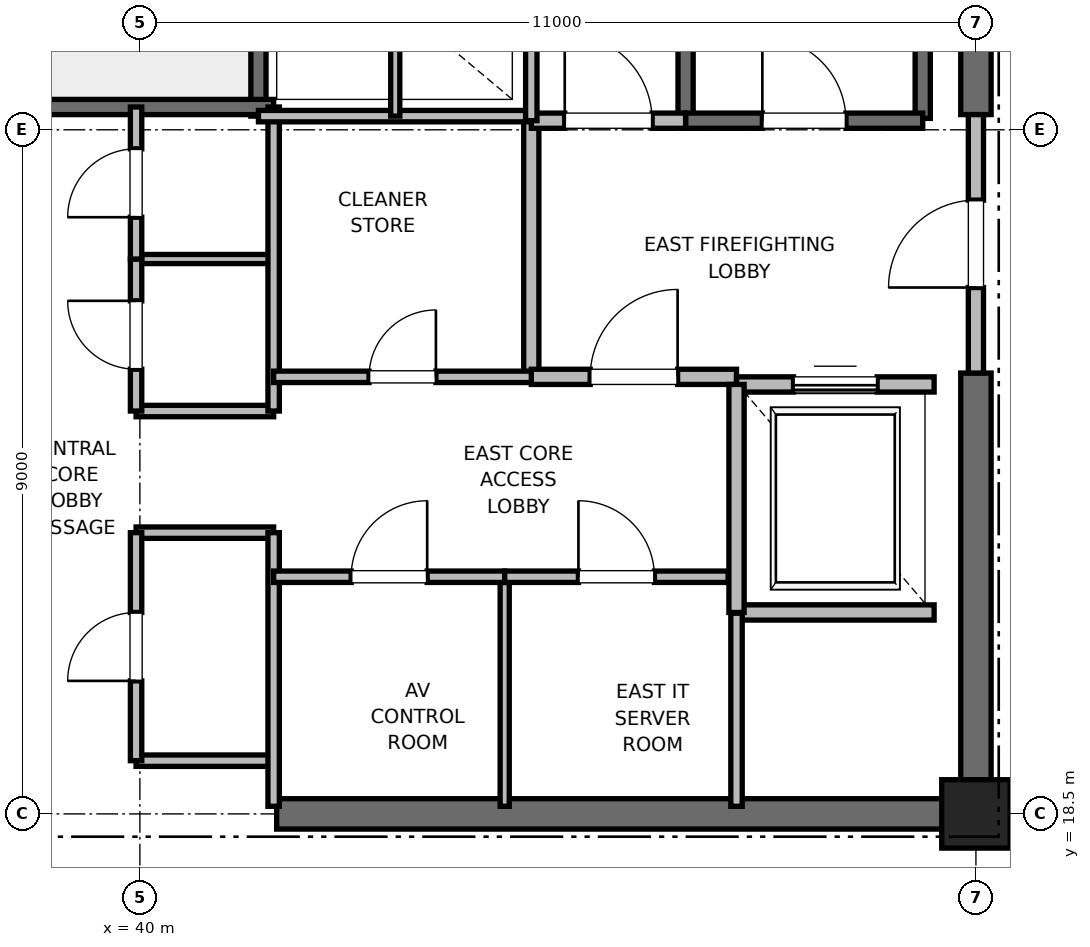
"""IFC4 building model, lengths in metres.
Left out: names, types, materials, properties, quantities, classifications, styles, units other than length and angle.
Written with IfcOpenShell. Run it as: python <this file> out.ifc"""

import sys

from ifc_helpers import new_model, si_unit, direction, frame, frame_2d, origin, origin_2d, place, context, subcontext, project, spatial, rectangle, extrude, element, fill, save


model = new_model("IFC4")
c1 = context("Model", 3, precision=1e-05, world=origin(), true_north=direction((0.0, 1.0)))
c2 = subcontext(c1, "Body", "Model", "MODEL_VIEW")
j1 = project(units=[si_unit("LENGTHUNIT", "METRE"), si_unit("PLANEANGLEUNIT", "RADIAN")], contexts=[c1])
p1 = place(None, origin())
s1 = spatial("IfcSite", under=j1, at=p1, CompositionType="ELEMENT")
p2 = place(p1, origin())
s2 = spatial("IfcBuilding", under=s1, at=p2, CompositionType="ELEMENT")
p3 = place(p2, frame((0.0, 0.0, 338.8)))
s3 = spatial("IfcBuildingStorey", under=s2, at=p3, CompositionType="ELEMENT", Elevation=338.8)
p4 = place(p3, frame((51.0, 18.5, 0.0), z_axis=(0.0, 0.0, 1.0), x_axis=(1.0, 0.0, 0.0)))
e1 = element("IfcColumn", 1, at=p4, inside=s3, PredefinedType="PILASTER", context=c2, shape_type="SweptSolid", body=[
    extrude(rectangle(XDim=0.9, YDim=0.9, at=origin_2d()), origin(), (0.0, 0.0, 1.0), 4.0),
])
p5 = place(p3, frame((41.8, 18.5, 0.0), z_axis=(0.0, 0.0, 1.0), x_axis=(1.0, 0.0, 0.0)))
e2 = element("IfcWall", 2, at=p5, inside=s3, PredefinedType="SHEAR", context=c2, shape_type="SweptSolid", body=[
    extrude(rectangle(XDim=9.2, YDim=0.4, at=frame_2d((4.6, 0.0))), origin(), (0.0, 0.0, 1.0), 3.7),
])
p6 = place(p3, frame((51.0, 18.5, 0.0), z_axis=(0.0, 0.0, 1.0), x_axis=(0.0, 1.0, 0.0)))
e3 = element("IfcWall", 3, at=p6, inside=s3, PredefinedType="SHEAR", context=c2, shape_type="SweptSolid", body=[
    extrude(rectangle(XDim=5.8, YDim=0.4, at=frame_2d((2.9, 0.0))), origin(), (0.0, 0.0, 1.0), 3.7),
])
p7 = place(p3, frame((51.0, 27.7, 0.0), z_axis=(0.0, 0.0, 1.0), x_axis=(0.0, 1.0, 0.0)))
e4 = element("IfcWall", 4, at=p7, inside=s3, PredefinedType="SHEAR", context=c2, shape_type="SweptSolid", body=[
    extrude(rectangle(XDim=8.8, YDim=0.4, at=frame_2d((4.4, 0.0))), origin(), (0.0, 0.0, 1.0), 3.7),
])
p8 = place(p3, frame((50.3, 27.65, 0.0), z_axis=(0.0, 0.0, 1.0), x_axis=(0.0, 1.0, 0.0)))
e5 = element("IfcWall", 5, at=p8, inside=s3, PredefinedType="SOLIDWALL", context=c2, shape_type="SweptSolid", body=[
    extrude(rectangle(XDim=8.15, YDim=0.2, at=frame_2d((4.075, 0.0))), origin(), (0.0, 0.0, 1.0), 3.7),
])
p9 = place(p3, frame((47.18, 27.62, 0.0), z_axis=(0.0, 0.0, 1.0), x_axis=(0.0, 1.0, 0.0)))
e6 = element("IfcWall", 6, at=p9, inside=s3, PredefinedType="SOLIDWALL", context=c2, shape_type="SweptSolid", body=[
    extrude(rectangle(XDim=8.18, YDim=0.2, at=frame_2d((4.09, 0.0))), origin(), (0.0, 0.0, 1.0), 3.7),
])
p10 = place(p3, frame((47.18, 27.62, 0.0), z_axis=(0.0, 0.0, 1.0), x_axis=(1.0, 0.0, 0.0)))
e7 = element("IfcWall", 7, at=p10, inside=s3, PredefinedType="SOLIDWALL", context=c2, shape_type="SweptSolid", body=[
    extrude(rectangle(XDim=3.12, YDim=0.2, at=frame_2d((1.56, 0.0))), origin(), (0.0, 0.0, 1.0), 3.7),
])
p11 = place(p10, frame((1.01, 0.0, 0.0)))
e8 = element("IfcOpeningElement", 8, at=p11, cuts=e7, PredefinedType="OPENING", context=c2, shape_type="SweptSolid", body=[
    extrude(rectangle(XDim=1.1, YDim=2.15, at=frame_2d((0.55, 1.075))), frame((0.0, 0.1, 0.0), z_axis=(0.0, -1.0, 0.0), x_axis=(1.0, 0.0, 0.0)), (0.0, 0.0, 1.0), 0.2),
])
p12 = place(p3, frame((41.56, 27.68, 0.0), z_axis=(0.0, 0.0, 1.0), x_axis=(0.0, 1.0, 0.0)))
e9 = element("IfcWall", 9, at=p12, inside=s3, PredefinedType="SOLIDWALL", context=c2, shape_type="SweptSolid", body=[
    extrude(rectangle(XDim=8.57, YDim=0.2, at=frame_2d((4.285, 0.0))), origin(), (0.0, 0.0, 1.0), 3.7),
])
p13 = place(p3, frame((38.44, 27.8, 0.0), z_axis=(0.0, 0.0, 1.0), x_axis=(1.0, 0.0, 0.0)))
e10 = element("IfcWall", 10, at=p13, inside=s3, PredefinedType="SOLIDWALL", context=c2, shape_type="SweptSolid", body=[
    extrude(rectangle(XDim=3.32, YDim=0.2, at=frame_2d((1.66, 0.0))), origin(), (0.0, 0.0, 1.0), 3.7),
])
p14 = place(p3, frame((45.15, 24.25, 0.0), z_axis=(0.0, 0.0, 1.0), x_axis=(0.0, 1.0, 0.0)))
e11 = element("IfcWall", 11, at=p14, inside=s3, PredefinedType="PARTITIONING", context=c2, shape_type="SweptSolid", body=[
    extrude(rectangle(XDim=3.37, YDim=0.2, at=frame_2d((1.685, 0.0))), origin(), (0.0, 0.0, 1.0), 3.7),
])
p15 = place(p3, frame((45.15, 24.25, 0.0), z_axis=(0.0, 0.0, 1.0), x_axis=(1.0, 0.0, 0.0)))
e12 = element("IfcWall", 12, at=p15, inside=s3, PredefinedType="PARTITIONING", context=c2, shape_type="SweptSolid", body=[
    extrude(rectangle(XDim=2.7, YDim=0.2, at=frame_2d((1.35, 0.0))), origin(), (0.0, 0.0, 1.0), 3.7),
])
p16 = place(p15, frame((0.775, 0.0, 0.0)))
e13 = element("IfcOpeningElement", 13, at=p16, cuts=e12, PredefinedType="OPENING", context=c2, shape_type="SweptSolid", body=[
    extrude(rectangle(XDim=1.15, YDim=2.2, at=frame_2d((0.575, 1.1))), frame((0.0, 0.1, 0.0), z_axis=(0.0, -1.0, 0.0), x_axis=(1.0, 0.0, 0.0)), (0.0, 0.0, 1.0), 0.2),
])
p17 = place(p3, frame((45.15, 27.62, 0.0), z_axis=(0.0, 0.0, 1.0), x_axis=(1.0, 0.0, 0.0)))
e14 = element("IfcWall", 14, at=p17, inside=s3, PredefinedType="PARTITIONING", context=c2, shape_type="SweptSolid", body=[
    extrude(rectangle(XDim=2.03, YDim=0.2, at=frame_2d((1.015, 0.0))), origin(), (0.0, 0.0, 1.0), 3.7),
])
p18 = place(p17, frame((0.44, 0.0, 0.0)))
e15 = element("IfcOpeningElement", 15, at=p18, cuts=e14, PredefinedType="OPENING", context=c2, shape_type="SweptSolid", body=[
    extrude(rectangle(XDim=1.15, YDim=2.2, at=frame_2d((0.575, 1.1))), frame((0.0, 0.1, 0.0), z_axis=(0.0, -1.0, 0.0), x_axis=(1.0, 0.0, 0.0)), (0.0, 0.0, 1.0), 0.2),
])
p19 = place(p3, frame((51.0, 24.3, 0.0), z_axis=(0.0, 0.0, 1.0), x_axis=(0.0, 1.0, 0.0)))
e16 = element("IfcWall", 16, at=p19, inside=s3, PredefinedType="PARTITIONING", context=c2, shape_type="SweptSolid", body=[
    extrude(rectangle(XDim=3.4, YDim=0.2, at=frame_2d((1.7, 0.0))), origin(), (0.0, 0.0, 1.0), 2.78),
])
p20 = place(p19, frame((1.125, 0.0, 0.0)))
e17 = element("IfcOpeningElement", 17, at=p20, cuts=e16, PredefinedType="OPENING", context=c2, shape_type="SweptSolid", body=[
    extrude(rectangle(XDim=1.15, YDim=2.2, at=frame_2d((0.575, 1.1))), frame((0.0, 0.1, 0.0), z_axis=(0.0, -1.0, 0.0), x_axis=(1.0, 0.0, 0.0)), (0.0, 0.0, 1.0), 0.2),
])
p21 = place(p3, frame((47.85, 21.15, 0.0), z_axis=(0.0, 0.0, 1.0), x_axis=(1.0, 0.0, 0.0)))
e18 = element("IfcWall", 18, at=p21, inside=s3, PredefinedType="SOLIDWALL", context=c2, shape_type="SweptSolid", body=[
    extrude(rectangle(XDim=2.6, YDim=0.2, at=frame_2d((1.3, 0.0))), origin(), (0.0, 0.0, 1.0), 3.7),
])
p22 = place(p3, frame((50.45, 24.15, 0.0), z_axis=(0.0, 0.0, 1.0), x_axis=(-1.0, 0.0, 0.0)))
e19 = element("IfcWall", 19, at=p22, inside=s3, PredefinedType="SOLIDWALL", context=c2, shape_type="SweptSolid", body=[
    extrude(rectangle(XDim=2.6, YDim=0.2, at=frame_2d((1.3, 0.0))), origin(), (0.0, 0.0, 1.0), 2.78),
])
p23 = place(p22, frame((0.75, 0.0, 0.0)))
e20 = element("IfcOpeningElement", 20, at=p23, cuts=e19, PredefinedType="OPENING", context=c2, shape_type="SweptSolid", body=[
    extrude(rectangle(XDim=1.1, YDim=2.2, at=frame_2d((0.55, 1.1))), frame((0.0, 0.1, 0.0), z_axis=(0.0, -1.0, 0.0), x_axis=(1.0, 0.0, 0.0)), (0.0, 0.0, 1.0), 0.2),
])
p24 = place(p3, frame((47.85, 24.15, 0.0), z_axis=(0.0, 0.0, 1.0), x_axis=(0.0, -1.0, 0.0)))
e21 = element("IfcWall", 21, at=p24, inside=s3, PredefinedType="SOLIDWALL", context=c2, shape_type="SweptSolid", body=[
    extrude(rectangle(XDim=3.0, YDim=0.2, at=frame_2d((1.5, 0.0))), origin(), (0.0, 0.0, 1.0), 3.7),
])
for number, where, z_axis, x_axis in (
    (22, (39.95, 19.2, 0.0), (0.0, 0.0, 1.0), (1.0, 0.0, 0.0)),
    (23, (39.95, 22.2, 0.0), (0.0, 0.0, 1.0), (1.0, 0.0, 0.0)),
    (24, (39.95, 23.8, 0.0), (0.0, 0.0, 1.0), (1.0, 0.0, 0.0)),
):
    element("IfcWall", number, at=place(p3, frame(where, z_axis=z_axis, x_axis=x_axis)), inside=s3, PredefinedType="PARTITIONING", context=c2, shape_type="SweptSolid", body=[
        extrude(rectangle(XDim=1.81, YDim=0.15, at=frame_2d((0.905, 0.0))), origin(), (0.0, 0.0, 1.0), 2.85),
    ])
p25 = place(p3, frame((39.95, 25.8, 0.0), z_axis=(0.0, 0.0, 1.0), x_axis=(1.0, 0.0, 0.0)))
e25 = element("IfcWall", 25, at=p25, inside=s3, PredefinedType="PARTITIONING", context=c2, shape_type="SweptSolid", body=[
    extrude(rectangle(XDim=1.81, YDim=0.12, at=frame_2d((0.905, 0.0))), origin(), (0.0, 0.0, 1.0), 2.85),
])
p26 = place(p3, frame((41.76, 18.6, 0.0), z_axis=(0.0, 0.0, 1.0), x_axis=(0.0, 1.0, 0.0)))
e26 = element("IfcWall", 26, at=p26, inside=s3, PredefinedType="PARTITIONING", context=c2, shape_type="SweptSolid", body=[
    extrude(rectangle(XDim=3.6, YDim=0.15, at=frame_2d((1.8, 0.0))), origin(), (0.0, 0.0, 1.0), 2.78),
])
p27 = place(p3, frame((41.76, 23.8, 0.0), z_axis=(0.0, 0.0, 1.0), x_axis=(0.0, 1.0, 0.0)))
e27 = element("IfcWall", 27, at=p27, inside=s3, PredefinedType="PARTITIONING", context=c2, shape_type="SweptSolid", body=[
    extrude(rectangle(XDim=4.0, YDim=0.15, at=frame_2d((2.0, 0.0))), origin(), (0.0, 0.0, 1.0), 2.85),
])
p28 = place(p3, frame((39.95, 19.2, 0.0), z_axis=(0.0, 0.0, 1.0), x_axis=(0.0, 1.0, 0.0)))
e28 = element("IfcWall", 28, at=p28, inside=s3, PredefinedType="PARTITIONING", context=c2, shape_type="SweptSolid", body=[
    extrude(rectangle(XDim=3.0, YDim=0.15, at=frame_2d((1.5, 0.0))), origin(), (0.0, 0.0, 1.0), 2.85),
])
p29 = place(p28, frame((1.05, 0.0, 0.0)))
e29 = element("IfcOpeningElement", 29, at=p29, cuts=e28, PredefinedType="OPENING", context=c2, shape_type="SweptSolid", body=[
    extrude(rectangle(XDim=0.9, YDim=2.1, at=frame_2d((0.45, 1.05))), frame((0.0, 0.075, 0.0), z_axis=(0.0, -1.0, 0.0), x_axis=(1.0, 0.0, 0.0)), (0.0, 0.0, 1.0), 0.15),
])
p30 = place(p3, frame((39.95, 23.8, 0.0), z_axis=(0.0, 0.0, 1.0), x_axis=(0.0, 1.0, 0.0)))
e30 = element("IfcWall", 30, at=p30, inside=s3, PredefinedType="PARTITIONING", context=c2, shape_type="SweptSolid", body=[
    extrude(rectangle(XDim=2.0, YDim=0.15, at=frame_2d((1.0, 0.0))), origin(), (0.0, 0.0, 1.0), 2.85),
])
p31 = place(p30, frame((0.55, 0.0, 0.0)))
e31 = element("IfcOpeningElement", 31, at=p31, cuts=e30, PredefinedType="OPENING", context=c2, shape_type="SweptSolid", body=[
    extrude(rectangle(XDim=0.9, YDim=2.1, at=frame_2d((0.45, 1.05))), frame((0.0, 0.075, 0.0), z_axis=(0.0, -1.0, 0.0), x_axis=(1.0, 0.0, 0.0)), (0.0, 0.0, 1.0), 0.15),
])
p32 = place(p3, frame((39.95, 25.8, 0.0), z_axis=(0.0, 0.0, 1.0), x_axis=(0.0, 1.0, 0.0)))
e32 = element("IfcWall", 32, at=p32, inside=s3, PredefinedType="PARTITIONING", context=c2, shape_type="SweptSolid", body=[
    extrude(rectangle(XDim=2.0, YDim=0.15, at=frame_2d((1.0, 0.0))), origin(), (0.0, 0.0, 1.0), 2.85),
])
p33 = place(p32, frame((0.55, 0.0, 0.0)))
e33 = element("IfcOpeningElement", 33, at=p33, cuts=e32, PredefinedType="OPENING", context=c2, shape_type="SweptSolid", body=[
    extrude(rectangle(XDim=0.9, YDim=2.1, at=frame_2d((0.45, 1.05))), frame((0.0, 0.075, 0.0), z_axis=(0.0, -1.0, 0.0), x_axis=(1.0, 0.0, 0.0)), (0.0, 0.0, 1.0), 0.15),
])
p34 = place(p3, frame((41.56, 27.68, 0.0), z_axis=(0.0, 0.0, 1.0), x_axis=(1.0, 0.0, 0.0)))
e34 = element("IfcWall", 34, at=p34, inside=s3, PredefinedType="PARTITIONING", context=c2, shape_type="SweptSolid", body=[
    extrude(rectangle(XDim=3.59, YDim=0.15, at=frame_2d((1.795, 0.0))), origin(), (0.0, 0.0, 1.0), 2.85),
])
p35 = place(p3, frame((47.85, 18.6, 0.0), z_axis=(0.0, 0.0, 1.0), x_axis=(0.0, 1.0, 0.0)))
e35 = element("IfcWall", 35, at=p35, inside=s3, PredefinedType="PARTITIONING", context=c2, shape_type="SweptSolid", body=[
    extrude(rectangle(XDim=2.54, YDim=0.15, at=frame_2d((1.27, 0.0))), origin(), (0.0, 0.0, 1.0), 2.85),
])
p36 = place(p3, frame((44.8, 18.6, 0.0), z_axis=(0.0, 0.0, 1.0), x_axis=(0.0, 1.0, 0.0)))
e36 = element("IfcWall", 36, at=p36, inside=s3, PredefinedType="PARTITIONING", context=c2, shape_type="SweptSolid", body=[
    extrude(rectangle(XDim=3.02, YDim=0.12, at=frame_2d((1.51, 0.0))), origin(), (0.0, 0.0, 1.0), 2.85),
])
p37 = place(p3, frame((41.76, 21.62, 0.0), z_axis=(0.0, 0.0, 1.0), x_axis=(1.0, 0.0, 0.0)))
e37 = element("IfcWall", 37, at=p37, inside=s3, PredefinedType="PARTITIONING", context=c2, shape_type="SweptSolid", body=[
    extrude(rectangle(XDim=3.04, YDim=0.15, at=frame_2d((1.52, 0.0))), origin(), (0.0, 0.0, 1.0), 2.85),
])
p38 = place(p37, frame((1.02, 0.0, 0.0)))
e38 = element("IfcOpeningElement", 38, at=p38, cuts=e37, PredefinedType="OPENING", context=c2, shape_type="SweptSolid", body=[
    extrude(rectangle(XDim=1.0, YDim=2.15, at=frame_2d((0.5, 1.075))), frame((0.0, 0.075, 0.0), z_axis=(0.0, -1.0, 0.0), x_axis=(1.0, 0.0, 0.0)), (0.0, 0.0, 1.0), 0.15),
])
p39 = place(p3, frame((44.8, 21.62, 0.0), z_axis=(0.0, 0.0, 1.0), x_axis=(1.0, 0.0, 0.0)))
e39 = element("IfcWall", 39, at=p39, inside=s3, PredefinedType="PARTITIONING", context=c2, shape_type="SweptSolid", body=[
    extrude(rectangle(XDim=2.94, YDim=0.15, at=frame_2d((1.47, 0.0))), origin(), (0.0, 0.0, 1.0), 2.85),
])
p40 = place(p39, frame((0.97, 0.0, 0.0)))
e40 = element("IfcOpeningElement", 40, at=p40, cuts=e39, PredefinedType="OPENING", context=c2, shape_type="SweptSolid", body=[
    extrude(rectangle(XDim=1.0, YDim=2.15, at=frame_2d((0.5, 1.075))), frame((0.0, 0.075, 0.0), z_axis=(0.0, -1.0, 0.0), x_axis=(1.0, 0.0, 0.0)), (0.0, 0.0, 1.0), 0.15),
])
p41 = place(p3, frame((41.76, 24.25, 0.0), z_axis=(0.0, 0.0, 1.0), x_axis=(1.0, 0.0, 0.0)))
e41 = element("IfcWall", 41, at=p41, inside=s3, PredefinedType="PARTITIONING", context=c2, shape_type="SweptSolid", body=[
    extrude(rectangle(XDim=3.39, YDim=0.15, at=frame_2d((1.695, 0.0))), origin(), (0.0, 0.0, 1.0), 2.85),
])
p42 = place(p41, frame((1.255, 0.0, 0.0)))
e42 = element("IfcOpeningElement", 42, at=p42, cuts=e41, PredefinedType="OPENING", context=c2, shape_type="SweptSolid", body=[
    extrude(rectangle(XDim=0.88, YDim=2.1, at=frame_2d((0.44, 1.05))), frame((0.0, 0.075, 0.0), z_axis=(0.0, -1.0, 0.0), x_axis=(1.0, 0.0, 0.0)), (0.0, 0.0, 1.0), 0.15),
])
p43 = place(p3, frame((45.15, 27.62, 0.0), z_axis=(0.0, 0.0, 1.0), x_axis=(0.0, 1.0, 0.0)))
e43 = element("IfcWall", 43, at=p43, inside=s3, PredefinedType="PARTITIONING", context=c2, shape_type="SweptSolid", body=[
    extrude(rectangle(XDim=3.1, YDim=0.15, at=frame_2d((1.55, 0.0))), origin(), (0.0, 0.0, 1.0), 2.85),
])
p44 = place(p3, frame((43.36, 27.68, 0.0), z_axis=(0.0, 0.0, 1.0), x_axis=(0.0, 1.0, 0.0)))
e44 = element("IfcWall", 44, at=p44, inside=s3, PredefinedType="PARTITIONING", context=c2, shape_type="SweptSolid", body=[
    extrude(rectangle(XDim=3.04, YDim=0.12, at=frame_2d((1.52, 0.0))), origin(), (0.0, 0.0, 1.0), 2.85),
])
p45 = place(p11, origin())
e45 = element("IfcDoor", 45, at=p45, inside=s3, OperationType="SINGLE_SWING_LEFT", PredefinedType="DOOR", context=c2, shape_type="SweptSolid", body=[
    extrude(rectangle(XDim=1.1, YDim=2.15, at=frame_2d((0.55, 1.075))), frame((0.0, 0.025, 0.0), z_axis=(0.0, -1.0, 0.0), x_axis=(1.0, 0.0, 0.0)), (0.0, 0.0, 1.0), 0.05),
])
fill(e8, e45)
p46 = place(p16, origin())
e46 = element("IfcDoor", 46, at=p46, inside=s3, OperationType="SINGLE_SWING_RIGHT", PredefinedType="DOOR", context=c2, shape_type="SweptSolid", body=[
    extrude(rectangle(XDim=1.15, YDim=2.2, at=frame_2d((0.575, 1.1))), frame((0.0, 0.025, 0.0), z_axis=(0.0, -1.0, 0.0), x_axis=(1.0, 0.0, 0.0)), (0.0, 0.0, 1.0), 0.05),
])
fill(e13, e46)
p47 = place(p18, origin())
e47 = element("IfcDoor", 47, at=p47, inside=s3, OperationType="SINGLE_SWING_LEFT", PredefinedType="DOOR", context=c2, shape_type="SweptSolid", body=[
    extrude(rectangle(XDim=1.15, YDim=2.2, at=frame_2d((0.575, 1.1))), frame((0.0, 0.025, 0.0), z_axis=(0.0, -1.0, 0.0), x_axis=(1.0, 0.0, 0.0)), (0.0, 0.0, 1.0), 0.05),
])
fill(e15, e47)
p48 = place(p20, origin())
e48 = element("IfcDoor", 48, at=p48, inside=s3, OperationType="SINGLE_SWING_LEFT", PredefinedType="DOOR", context=c2, shape_type="SweptSolid", body=[
    extrude(rectangle(XDim=1.15, YDim=2.2, at=frame_2d((0.575, 1.1))), frame((0.0, 0.025, 0.0), z_axis=(0.0, -1.0, 0.0), x_axis=(1.0, 0.0, 0.0)), (0.0, 0.0, 1.0), 0.05),
])
fill(e17, e48)
p49 = place(p23, origin())
e49 = element("IfcDoor", 49, at=p49, inside=s3, OperationType="SLIDING_TO_RIGHT", PredefinedType="DOOR", context=c2, shape_type="SweptSolid", body=[
    extrude(rectangle(XDim=1.1, YDim=2.2, at=frame_2d((0.55, 1.1))), frame((0.0, 0.025, 0.0), z_axis=(0.0, -1.0, 0.0), x_axis=(1.0, 0.0, 0.0)), (0.0, 0.0, 1.0), 0.05),
])
fill(e20, e49)
p50 = place(p29, origin())
e50 = element("IfcDoor", 50, at=p50, inside=s3, OperationType="SINGLE_SWING_LEFT", PredefinedType="DOOR", context=c2, shape_type="SweptSolid", body=[
    extrude(rectangle(XDim=0.9, YDim=2.1, at=frame_2d((0.45, 1.05))), frame((0.0, 0.025, 0.0), z_axis=(0.0, -1.0, 0.0), x_axis=(1.0, 0.0, 0.0)), (0.0, 0.0, 1.0), 0.05),
])
fill(e29, e50)
p51 = place(p31, origin())
e51 = element("IfcDoor", 51, at=p51, inside=s3, OperationType="SINGLE_SWING_RIGHT", PredefinedType="DOOR", context=c2, shape_type="SweptSolid", body=[
    extrude(rectangle(XDim=0.9, YDim=2.1, at=frame_2d((0.45, 1.05))), frame((0.0, 0.025, 0.0), z_axis=(0.0, -1.0, 0.0), x_axis=(1.0, 0.0, 0.0)), (0.0, 0.0, 1.0), 0.05),
])
fill(e31, e51)
p52 = place(p33, origin())
e52 = element("IfcDoor", 52, at=p52, inside=s3, OperationType="SINGLE_SWING_LEFT", PredefinedType="DOOR", context=c2, shape_type="SweptSolid", body=[
    extrude(rectangle(XDim=0.9, YDim=2.1, at=frame_2d((0.45, 1.05))), frame((0.0, 0.025, 0.0), z_axis=(0.0, -1.0, 0.0), x_axis=(1.0, 0.0, 0.0)), (0.0, 0.0, 1.0), 0.05),
])
fill(e33, e52)
p53 = place(p38, origin())
e53 = element("IfcDoor", 53, at=p53, inside=s3, OperationType="SINGLE_SWING_RIGHT", PredefinedType="DOOR", context=c2, shape_type="SweptSolid", body=[
    extrude(rectangle(XDim=1.0, YDim=2.15, at=frame_2d((0.5, 1.075))), frame((0.0, 0.025, 0.0), z_axis=(0.0, -1.0, 0.0), x_axis=(1.0, 0.0, 0.0)), (0.0, 0.0, 1.0), 0.05),
])
fill(e38, e53)
p54 = place(p40, origin())
e54 = element("IfcDoor", 54, at=p54, inside=s3, OperationType="SINGLE_SWING_LEFT", PredefinedType="DOOR", context=c2, shape_type="SweptSolid", body=[
    extrude(rectangle(XDim=1.0, YDim=2.15, at=frame_2d((0.5, 1.075))), frame((0.0, 0.025, 0.0), z_axis=(0.0, -1.0, 0.0), x_axis=(1.0, 0.0, 0.0)), (0.0, 0.0, 1.0), 0.05),
])
fill(e40, e54)
p55 = place(p42, origin())
e55 = element("IfcDoor", 55, at=p55, inside=s3, OperationType="SINGLE_SWING_RIGHT", PredefinedType="DOOR", context=c2, shape_type="SweptSolid", body=[
    extrude(rectangle(XDim=0.88, YDim=2.1, at=frame_2d((0.44, 1.05))), frame((0.0, 0.025, 0.0), z_axis=(0.0, -1.0, 0.0), x_axis=(1.0, 0.0, 0.0)), (0.0, 0.0, 1.0), 0.05),
])
fill(e42, e55)
save(model, sys.argv[1])
